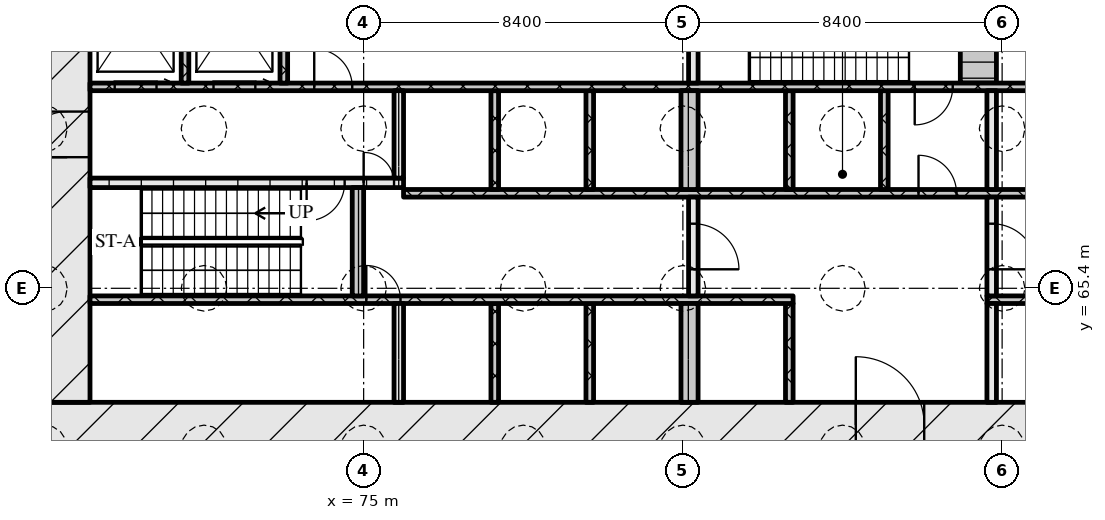
"""IFC4 building model, lengths in metres.
Left out: names, types, materials, properties, quantities, classifications, styles, units other than length and angle.
Written with IfcOpenShell. Run it as: python <this file> out.ifc"""

import sys

from ifc_helpers import new_model, si_unit, direction, frame, frame_2d, origin, place, context, subcontext, project, spatial, rectangle, extrude, element, fill, save


model = new_model("IFC4")
c1 = context("Model", 3, precision=1e-05, world=origin(), true_north=direction((0.0, 1.0)))
c2 = subcontext(c1, "Body", "Model", "MODEL_VIEW")
j1 = project(units=[si_unit("LENGTHUNIT", "METRE"), si_unit("PLANEANGLEUNIT", "RADIAN")], contexts=[c1])
p1 = place(None, origin())
s1 = spatial("IfcSite", under=j1, at=p1, CompositionType="ELEMENT")
p2 = place(p1, origin())
s2 = spatial("IfcBuilding", under=s1, at=p2, CompositionType="ELEMENT")
p3 = place(p2, frame((0.0, 0.0, -6.0)))
s3 = spatial("IfcBuildingStorey", under=s2, at=p3, CompositionType="ELEMENT", Elevation=-6.0)
p4 = place(p3, frame((66.6, 61.8, 0.0), z_axis=(0.0, 0.0, 1.0), x_axis=(1.0, 0.0, 0.0)))
e1 = element("IfcWall", 1, at=p4, inside=s3, PredefinedType="SOLIDWALL", context=c2, shape_type="SweptSolid", body=[
    extrude(rectangle(XDim=42.0, YDim=1.2, at=frame_2d((21.0, 0.0))), origin(), (0.0, 0.0, 1.0), 5.7),
])
p5 = place(p4, frame((21.35, 0.0, 0.0)))
e2 = element("IfcOpeningElement", 2, at=p5, cuts=e1, PredefinedType="OPENING", context=c2, shape_type="SweptSolid", body=[
    extrude(rectangle(XDim=1.8, YDim=2.1, at=frame_2d((0.9, 1.05))), frame((0.0, 0.61, 0.0), z_axis=(0.0, -1.0, 0.0), x_axis=(1.0, 0.0, 0.0)), (0.0, 0.0, 1.0), 1.22),
])
p6 = place(p3, frame((67.2, 62.4, 0.0), z_axis=(0.0, 0.0, 1.0), x_axis=(0.0, 1.0, 0.0)))
e3 = element("IfcWall", 3, at=p6, inside=s3, PredefinedType="SOLIDWALL", context=c2, shape_type="SweptSolid", body=[
    extrude(rectangle(XDim=12.0, YDim=1.2, at=frame_2d((6.0, 0.0))), origin(), (0.0, 0.0, 1.0), 5.7),
])
p7 = place(p6, frame((6.45, 0.0, 0.0)))
e4 = element("IfcOpeningElement", 4, at=p7, cuts=e3, PredefinedType="OPENING", context=c2, shape_type="SweptSolid", body=[
    extrude(rectangle(XDim=1.2, YDim=2.1, at=frame_2d((0.6, 1.05))), frame((0.0, 0.61, 0.0), z_axis=(0.0, -1.0, 0.0), x_axis=(1.0, 0.0, 0.0)), (0.0, 0.0, 1.0), 1.22),
])
p8 = place(p3, frame((75.925, 62.4, 0.0), z_axis=(0.0, 0.0, 1.0), x_axis=(0.0, 1.0, 0.0)))
e5 = element("IfcWall", 5, at=p8, inside=s3, PredefinedType="SOLIDWALL", context=c2, shape_type="SweptSolid", body=[
    extrude(rectangle(XDim=2.6, YDim=0.25, at=frame_2d((1.3, 0.0))), origin(), (0.0, 0.0, 1.0), 5.7),
])
for number, where, z_axis, x_axis in (
    (6, (78.45, 62.4, 0.0), (0.0, 0.0, 1.0), (0.0, 1.0, 0.0)),
    (7, (80.95, 62.4, 0.0), (0.0, 0.0, 1.0), (0.0, 1.0, 0.0)),
):
    element("IfcWall", number, at=place(p3, frame(where, z_axis=z_axis, x_axis=x_axis)), inside=s3, PredefinedType="SOLIDWALL", context=c2, shape_type="SweptSolid", body=[
        extrude(rectangle(XDim=2.6, YDim=0.2, at=frame_2d((1.3, 0.0))), origin(), (0.0, 0.0, 1.0), 5.7),
    ])
p9 = place(p3, frame((83.575, 62.4, 0.0), z_axis=(0.0, 0.0, 1.0), x_axis=(0.0, 1.0, 0.0)))
e8 = element("IfcWall", 8, at=p9, inside=s3, PredefinedType="SOLIDWALL", context=c2, shape_type="SweptSolid", body=[
    extrude(rectangle(XDim=2.6, YDim=0.45, at=frame_2d((1.3, 0.0))), origin(), (0.0, 0.0, 1.0), 5.7),
])
p10 = place(p3, frame((86.2, 62.4, 0.0), z_axis=(0.0, 0.0, 1.0), x_axis=(0.0, 1.0, 0.0)))
e9 = element("IfcWall", 9, at=p10, inside=s3, PredefinedType="SOLIDWALL", context=c2, shape_type="SweptSolid", body=[
    extrude(rectangle(XDim=2.6, YDim=0.2, at=frame_2d((1.3, 0.0))), origin(), (0.0, 0.0, 1.0), 5.7),
])
p11 = place(p3, frame((91.525, 62.4, 0.0), z_axis=(0.0, 0.0, 1.0), x_axis=(0.0, 1.0, 0.0)))
e10 = element("IfcWall", 10, at=p11, inside=s3, PredefinedType="SOLIDWALL", context=c2, shape_type="SweptSolid", body=[
    extrude(rectangle(XDim=2.6, YDim=0.25, at=frame_2d((1.3, 0.0))), origin(), (0.0, 0.0, 1.0), 5.7),
])
p12 = place(p3, frame((67.8, 65.1, 0.0), z_axis=(0.0, 0.0, 1.0), x_axis=(1.0, 0.0, 0.0)))
e11 = element("IfcWall", 11, at=p12, inside=s3, PredefinedType="SOLIDWALL", context=c2, shape_type="SweptSolid", body=[
    extrude(rectangle(XDim=18.5, YDim=0.2, at=frame_2d((9.25, 0.0))), origin(), (0.0, 0.0, 1.0), 5.7),
])
p13 = place(p12, frame((7.27, 0.0, 0.0)))
e12 = element("IfcOpeningElement", 12, at=p13, cuts=e11, PredefinedType="OPENING", context=c2, shape_type="SweptSolid", body=[
    extrude(rectangle(XDim=0.9, YDim=2.1, at=frame_2d((0.45, 1.05))), frame((0.0, 0.11, 0.0), z_axis=(0.0, -1.0, 0.0), x_axis=(1.0, 0.0, 0.0)), (0.0, 0.0, 1.0), 0.22),
])
p14 = place(p3, frame((91.4, 65.1, 0.0), z_axis=(0.0, 0.0, 1.0), x_axis=(1.0, 0.0, 0.0)))
e13 = element("IfcWall", 13, at=p14, inside=s3, PredefinedType="SOLIDWALL", context=c2, shape_type="SweptSolid", body=[
    extrude(rectangle(XDim=16.0, YDim=0.2, at=frame_2d((8.0, 0.0))), origin(), (0.0, 0.0, 1.0), 5.7),
])
p15 = place(p14, frame((7.83, 0.0, 0.0)))
e14 = element("IfcOpeningElement", 14, at=p15, cuts=e13, PredefinedType="OPENING", context=c2, shape_type="SweptSolid", body=[
    extrude(rectangle(XDim=0.9, YDim=2.1, at=frame_2d((0.45, 1.05))), frame((0.0, 0.11, 0.0), z_axis=(0.0, -1.0, 0.0), x_axis=(1.0, 0.0, 0.0)), (0.0, 0.0, 1.0), 0.22),
])
p16 = place(p3, frame((74.85, 65.2, 0.0), z_axis=(0.0, 0.0, 1.0), x_axis=(0.0, 1.0, 0.0)))
e15 = element("IfcWall", 15, at=p16, inside=s3, PredefinedType="SOLIDWALL", context=c2, shape_type="SweptSolid", body=[
    extrude(rectangle(XDim=2.85, YDim=0.3, at=frame_2d((1.425, 0.0))), origin(), (0.0, 0.0, 1.0), 5.7),
])
p17 = place(p3, frame((83.675, 65.2, 0.0), z_axis=(0.0, 0.0, 1.0), x_axis=(0.0, 1.0, 0.0)))
e16 = element("IfcWall", 16, at=p17, inside=s3, PredefinedType="SOLIDWALL", context=c2, shape_type="SweptSolid", body=[
    extrude(rectangle(XDim=2.6, YDim=0.25, at=frame_2d((1.3, 0.0))), origin(), (0.0, 0.0, 1.0), 5.7),
])
p18 = place(p17, frame((0.7, 0.0, 0.0)))
e17 = element("IfcOpeningElement", 17, at=p18, cuts=e16, PredefinedType="OPENING", context=c2, shape_type="SweptSolid", body=[
    extrude(rectangle(XDim=1.2, YDim=2.1, at=frame_2d((0.6, 1.05))), frame((0.0, 0.135, 0.0), z_axis=(0.0, -1.0, 0.0), x_axis=(1.0, 0.0, 0.0)), (0.0, 0.0, 1.0), 0.27),
])
p19 = place(p3, frame((91.525, 65.2, 0.0), z_axis=(0.0, 0.0, 1.0), x_axis=(0.0, 1.0, 0.0)))
e18 = element("IfcWall", 18, at=p19, inside=s3, PredefinedType="SOLIDWALL", context=c2, shape_type="SweptSolid", body=[
    extrude(rectangle(XDim=2.6, YDim=0.25, at=frame_2d((1.3, 0.0))), origin(), (0.0, 0.0, 1.0), 5.7),
])
p20 = place(p19, frame((0.7, 0.0, 0.0)))
e19 = element("IfcOpeningElement", 19, at=p20, cuts=e18, PredefinedType="OPENING", context=c2, shape_type="SweptSolid", body=[
    extrude(rectangle(XDim=1.2, YDim=2.1, at=frame_2d((0.6, 1.05))), frame((0.0, 0.135, 0.0), z_axis=(0.0, -1.0, 0.0), x_axis=(1.0, 0.0, 0.0)), (0.0, 0.0, 1.0), 0.27),
])
p21 = place(p3, frame((76.05, 67.9, 0.0), z_axis=(0.0, 0.0, 1.0), x_axis=(1.0, 0.0, 0.0)))
e20 = element("IfcWall", 20, at=p21, inside=s3, PredefinedType="SOLIDWALL", context=c2, shape_type="SweptSolid", body=[
    extrude(rectangle(XDim=23.1, YDim=0.2, at=frame_2d((11.55, 0.0))), origin(), (0.0, 0.0, 1.0), 5.7),
])
p22 = place(p21, frame((13.55, 0.0, 0.0)))
e21 = element("IfcOpeningElement", 21, at=p22, cuts=e20, PredefinedType="OPENING", context=c2, shape_type="SweptSolid", body=[
    extrude(rectangle(XDim=1.0, YDim=2.1, at=frame_2d((0.5, 1.05))), frame((0.0, 0.11, 0.0), z_axis=(0.0, -1.0, 0.0), x_axis=(1.0, 0.0, 0.0)), (0.0, 0.0, 1.0), 0.22),
])
for number, where, z_axis, x_axis in (
    (22, (78.45, 68.0, 0.0), (0.0, 0.0, 1.0), (0.0, 1.0, 0.0)),
    (23, (80.95, 68.0, 0.0), (0.0, 0.0, 1.0), (0.0, 1.0, 0.0)),
):
    element("IfcWall", number, at=place(p3, frame(where, z_axis=z_axis, x_axis=x_axis)), inside=s3, PredefinedType="SOLIDWALL", context=c2, shape_type="SweptSolid", body=[
        extrude(rectangle(XDim=2.6, YDim=0.2, at=frame_2d((1.3, 0.0))), origin(), (0.0, 0.0, 1.0), 5.7),
    ])
p23 = place(p3, frame((83.575, 68.0, 0.0), z_axis=(0.0, 0.0, 1.0), x_axis=(0.0, 1.0, 0.0)))
e24 = element("IfcWall", 24, at=p23, inside=s3, PredefinedType="SOLIDWALL", context=c2, shape_type="SweptSolid", body=[
    extrude(rectangle(XDim=2.6, YDim=0.45, at=frame_2d((1.3, 0.0))), origin(), (0.0, 0.0, 1.0), 5.7),
])
for number, where, z_axis, x_axis in (
    (25, (86.2, 68.0, 0.0), (0.0, 0.0, 1.0), (0.0, 1.0, 0.0)),
    (26, (88.7, 68.0, 0.0), (0.0, 0.0, 1.0), (0.0, 1.0, 0.0)),
):
    element("IfcWall", number, at=place(p3, frame(where, z_axis=z_axis, x_axis=x_axis)), inside=s3, PredefinedType="SOLIDWALL", context=c2, shape_type="SweptSolid", body=[
        extrude(rectangle(XDim=2.6, YDim=0.2, at=frame_2d((1.3, 0.0))), origin(), (0.0, 0.0, 1.0), 5.7),
    ])
p24 = place(p3, frame((91.525, 68.0, 0.0), z_axis=(0.0, 0.0, 1.0), x_axis=(0.0, 1.0, 0.0)))
e27 = element("IfcWall", 27, at=p24, inside=s3, PredefinedType="SOLIDWALL", context=c2, shape_type="SweptSolid", body=[
    extrude(rectangle(XDim=2.6, YDim=0.25, at=frame_2d((1.3, 0.0))), origin(), (0.0, 0.0, 1.0), 5.7),
])
p25 = place(p3, frame((67.8, 68.175, 0.0), z_axis=(0.0, 0.0, 1.0), x_axis=(1.0, 0.0, 0.0)))
e28 = element("IfcWall", 28, at=p25, inside=s3, PredefinedType="SOLIDWALL", context=c2, shape_type="SweptSolid", body=[
    extrude(rectangle(XDim=8.25, YDim=0.25, at=frame_2d((4.125, 0.0))), origin(), (0.0, 0.0, 1.0), 5.7),
])
p26 = place(p25, frame((5.7, 0.0, 0.0)))
e29 = element("IfcOpeningElement", 29, at=p26, cuts=e28, PredefinedType="OPENING", context=c2, shape_type="SweptSolid", body=[
    extrude(rectangle(XDim=1.0, YDim=2.1, at=frame_2d((0.5, 1.05))), frame((0.0, 0.135, 0.0), z_axis=(0.0, -1.0, 0.0), x_axis=(1.0, 0.0, 0.0)), (0.0, 0.0, 1.0), 0.27),
])
p27 = place(p25, frame((7.2, 0.0, 0.0)))
e30 = element("IfcOpeningElement", 30, at=p27, cuts=e28, PredefinedType="OPENING", context=c2, shape_type="SweptSolid", body=[
    extrude(rectangle(XDim=0.8, YDim=2.1, at=frame_2d((0.4, 1.05))), frame((0.0, 0.135, 0.0), z_axis=(0.0, -1.0, 0.0), x_axis=(1.0, 0.0, 0.0)), (0.0, 0.0, 1.0), 0.27),
])
p28 = place(p3, frame((75.925, 68.3, 0.0), z_axis=(0.0, 0.0, 1.0), x_axis=(0.0, 1.0, 0.0)))
e31 = element("IfcWall", 31, at=p28, inside=s3, PredefinedType="SOLIDWALL", context=c2, shape_type="SweptSolid", body=[
    extrude(rectangle(XDim=2.3, YDim=0.25, at=frame_2d((1.15, 0.0))), origin(), (0.0, 0.0, 1.0), 5.7),
])
p29 = place(p3, frame((67.8, 70.7, 0.0), z_axis=(0.0, 0.0, 1.0), x_axis=(1.0, 0.0, 0.0)))
e32 = element("IfcWall", 32, at=p29, inside=s3, PredefinedType="SOLIDWALL", context=c2, shape_type="SweptSolid", body=[
    extrude(rectangle(XDim=39.6, YDim=0.2, at=frame_2d((19.8, 0.0))), origin(), (0.0, 0.0, 1.0), 5.7),
])
p30 = place(p29, frame((0.65, 0.0, 0.0)))
e33 = element("IfcOpeningElement", 33, at=p30, cuts=e32, PredefinedType="OPENING", context=c2, shape_type="SweptSolid", body=[
    extrude(rectangle(XDim=1.1, YDim=2.1, at=frame_2d((0.55, 1.05))), frame((0.0, 0.11, 0.0), z_axis=(0.0, -1.0, 0.0), x_axis=(1.0, 0.0, 0.0)), (0.0, 0.0, 1.0), 0.22),
])
p31 = place(p29, frame((3.25, 0.0, 0.0)))
e34 = element("IfcOpeningElement", 34, at=p31, cuts=e32, PredefinedType="OPENING", context=c2, shape_type="SweptSolid", body=[
    extrude(rectangle(XDim=1.1, YDim=2.1, at=frame_2d((0.55, 1.05))), frame((0.0, 0.11, 0.0), z_axis=(0.0, -1.0, 0.0), x_axis=(1.0, 0.0, 0.0)), (0.0, 0.0, 1.0), 0.22),
])
p32 = place(p29, frame((5.9, 0.0, 0.0)))
e35 = element("IfcOpeningElement", 35, at=p32, cuts=e32, PredefinedType="OPENING", context=c2, shape_type="SweptSolid", body=[
    extrude(rectangle(XDim=1.0, YDim=2.1, at=frame_2d((0.5, 1.05))), frame((0.0, 0.11, 0.0), z_axis=(0.0, -1.0, 0.0), x_axis=(1.0, 0.0, 0.0)), (0.0, 0.0, 1.0), 0.22),
])
p33 = place(p29, frame((21.7, 0.0, 0.0)))
e36 = element("IfcOpeningElement", 36, at=p33, cuts=e32, PredefinedType="OPENING", context=c2, shape_type="SweptSolid", body=[
    extrude(rectangle(XDim=1.0, YDim=2.1, at=frame_2d((0.5, 1.05))), frame((0.0, 0.11, 0.0), z_axis=(0.0, -1.0, 0.0), x_axis=(1.0, 0.0, 0.0)), (0.0, 0.0, 1.0), 0.22),
])
p34 = place(p29, frame((32.7, 0.0, 0.0)))
e37 = element("IfcOpeningElement", 37, at=p34, cuts=e32, PredefinedType="OPENING", context=c2, shape_type="SweptSolid", body=[
    extrude(rectangle(XDim=1.0, YDim=2.1, at=frame_2d((0.5, 1.05))), frame((0.0, 0.11, 0.0), z_axis=(0.0, -1.0, 0.0), x_axis=(1.0, 0.0, 0.0)), (0.0, 0.0, 1.0), 0.22),
])
p35 = place(p29, frame((35.25, 0.0, 0.0)))
e38 = element("IfcOpeningElement", 38, at=p35, cuts=e32, PredefinedType="OPENING", context=c2, shape_type="SweptSolid", body=[
    extrude(rectangle(XDim=1.1, YDim=2.1, at=frame_2d((0.55, 1.05))), frame((0.0, 0.11, 0.0), z_axis=(0.0, -1.0, 0.0), x_axis=(1.0, 0.0, 0.0)), (0.0, 0.0, 1.0), 0.22),
])
p36 = place(p29, frame((37.85, 0.0, 0.0)))
e39 = element("IfcOpeningElement", 39, at=p36, cuts=e32, PredefinedType="OPENING", context=c2, shape_type="SweptSolid", body=[
    extrude(rectangle(XDim=1.1, YDim=2.1, at=frame_2d((0.55, 1.05))), frame((0.0, 0.11, 0.0), z_axis=(0.0, -1.0, 0.0), x_axis=(1.0, 0.0, 0.0)), (0.0, 0.0, 1.0), 0.22),
])
p37 = place(p3, frame((70.3, 70.8, 0.0), z_axis=(0.0, 0.0, 1.0), x_axis=(0.0, 1.0, 0.0)))
e40 = element("IfcWall", 40, at=p37, inside=s3, PredefinedType="SOLIDWALL", context=c2, shape_type="SweptSolid", body=[
    extrude(rectangle(XDim=3.6, YDim=0.2, at=frame_2d((1.8, 0.0))), origin(), (0.0, 0.0, 1.0), 5.7),
])
p38 = place(p3, frame((72.9, 70.8, 0.0), z_axis=(0.0, 0.0, 1.0), x_axis=(0.0, 1.0, 0.0)))
e41 = element("IfcWall", 41, at=p38, inside=s3, PredefinedType="SOLIDWALL", context=c2, shape_type="SweptSolid", body=[
    extrude(rectangle(XDim=1.2, YDim=0.2, at=frame_2d((0.6, 0.0))), origin(), (0.0, 0.0, 1.0), 5.7),
])
p39 = place(p3, frame((83.675, 70.8, 0.0), z_axis=(0.0, 0.0, 1.0), x_axis=(0.0, 1.0, 0.0)))
e42 = element("IfcWall", 42, at=p39, inside=s3, PredefinedType="SOLIDWALL", context=c2, shape_type="SweptSolid", body=[
    extrude(rectangle(XDim=1.2, YDim=0.25, at=frame_2d((0.6, 0.0))), origin(), (0.0, 0.0, 1.0), 5.7),
])
p40 = place(p3, frame((91.175, 70.8, 0.0), z_axis=(0.0, 0.0, 1.0), x_axis=(0.0, 1.0, 0.0)))
e43 = element("IfcWall", 43, at=p40, inside=s3, PredefinedType="SOLIDWALL", context=c2, shape_type="SweptSolid", body=[
    extrude(rectangle(XDim=1.2, YDim=0.95, at=frame_2d((0.6, 0.0))), origin(), (0.0, 0.0, 1.0), 5.7),
])
p41 = place(p5, origin())
e44 = element("IfcDoor", 44, at=p41, inside=s3, OperationType="DOUBLE_DOOR_SINGLE_SWING", PredefinedType="DOOR", context=c2, shape_type="SweptSolid", body=[
    extrude(rectangle(XDim=1.8, YDim=2.1, at=frame_2d((0.9, 1.05))), frame((0.0, 0.025, 0.0), z_axis=(0.0, -1.0, 0.0), x_axis=(1.0, 0.0, 0.0)), (0.0, 0.0, 1.0), 0.05),
])
fill(e2, e44)
p42 = place(p13, origin())
e45 = element("IfcDoor", 45, at=p42, inside=s3, OperationType="SINGLE_SWING_LEFT", PredefinedType="DOOR", context=c2, shape_type="SweptSolid", body=[
    extrude(rectangle(XDim=0.9, YDim=2.1, at=frame_2d((0.45, 1.05))), frame((0.0, 0.025, 0.0), z_axis=(0.0, -1.0, 0.0), x_axis=(1.0, 0.0, 0.0)), (0.0, 0.0, 1.0), 0.05),
])
fill(e12, e45)
p43 = place(p18, origin())
e46 = element("IfcDoor", 46, at=p43, inside=s3, OperationType="SINGLE_SWING_RIGHT", PredefinedType="DOOR", context=c2, shape_type="SweptSolid", body=[
    extrude(rectangle(XDim=1.2, YDim=2.1, at=frame_2d((0.6, 1.05))), frame((0.0, 0.025, 0.0), z_axis=(0.0, -1.0, 0.0), x_axis=(1.0, 0.0, 0.0)), (0.0, 0.0, 1.0), 0.05),
])
fill(e17, e46)
p44 = place(p20, origin())
e47 = element("IfcDoor", 47, at=p44, inside=s3, OperationType="SINGLE_SWING_RIGHT", PredefinedType="DOOR", context=c2, shape_type="SweptSolid", body=[
    extrude(rectangle(XDim=1.2, YDim=2.1, at=frame_2d((0.6, 1.05))), frame((0.0, 0.025, 0.0), z_axis=(0.0, -1.0, 0.0), x_axis=(1.0, 0.0, 0.0)), (0.0, 0.0, 1.0), 0.05),
])
fill(e19, e47)
p45 = place(p22, origin())
e48 = element("IfcDoor", 48, at=p45, inside=s3, OperationType="SINGLE_SWING_LEFT", PredefinedType="DOOR", context=c2, shape_type="SweptSolid", body=[
    extrude(rectangle(XDim=1.0, YDim=2.1, at=frame_2d((0.5, 1.05))), frame((0.0, 0.025, 0.0), z_axis=(0.0, -1.0, 0.0), x_axis=(1.0, 0.0, 0.0)), (0.0, 0.0, 1.0), 0.05),
])
fill(e21, e48)
p46 = place(p26, origin())
e49 = element("IfcDoor", 49, at=p46, inside=s3, OperationType="SINGLE_SWING_RIGHT", PredefinedType="DOOR", context=c2, shape_type="SweptSolid", body=[
    extrude(rectangle(XDim=1.0, YDim=2.1, at=frame_2d((0.5, 1.05))), frame((0.0, 0.025, 0.0), z_axis=(0.0, -1.0, 0.0), x_axis=(1.0, 0.0, 0.0)), (0.0, 0.0, 1.0), 0.05),
])
fill(e29, e49)
p47 = place(p27, origin())
e50 = element("IfcDoor", 50, at=p47, inside=s3, OperationType="SINGLE_SWING_LEFT", PredefinedType="DOOR", context=c2, shape_type="SweptSolid", body=[
    extrude(rectangle(XDim=0.8, YDim=2.1, at=frame_2d((0.4, 1.05))), frame((0.0, 0.025, 0.0), z_axis=(0.0, -1.0, 0.0), x_axis=(1.0, 0.0, 0.0)), (0.0, 0.0, 1.0), 0.05),
])
fill(e30, e50)
p48 = place(p7, origin())
e51 = element("IfcDoor", 51, at=p48, inside=s3, OperationType="SINGLE_SWING_LEFT", PredefinedType="DOOR", context=c2, shape_type="SweptSolid", body=[
    extrude(rectangle(XDim=1.2, YDim=2.1, at=frame_2d((0.6, 1.05))), frame((0.0, 0.025, 0.0), z_axis=(0.0, -1.0, 0.0), x_axis=(1.0, 0.0, 0.0)), (0.0, 0.0, 1.0), 0.05),
])
fill(e4, e51)
p49 = place(p30, origin())
e52 = element("IfcDoor", 52, at=p49, inside=s3, OperationType="SLIDING_TO_RIGHT", PredefinedType="DOOR", context=c2, shape_type="SweptSolid", body=[
    extrude(rectangle(XDim=1.1, YDim=2.1, at=frame_2d((0.55, 1.05))), frame((0.0, 0.025, 0.0), z_axis=(0.0, -1.0, 0.0), x_axis=(1.0, 0.0, 0.0)), (0.0, 0.0, 1.0), 0.05),
])
fill(e33, e52)
p50 = place(p31, origin())
e53 = element("IfcDoor", 53, at=p50, inside=s3, OperationType="SLIDING_TO_RIGHT", PredefinedType="DOOR", context=c2, shape_type="SweptSolid", body=[
    extrude(rectangle(XDim=1.1, YDim=2.1, at=frame_2d((0.55, 1.05))), frame((0.0, 0.025, 0.0), z_axis=(0.0, -1.0, 0.0), x_axis=(1.0, 0.0, 0.0)), (0.0, 0.0, 1.0), 0.05),
])
fill(e34, e53)
p51 = place(p32, origin())
e54 = element("IfcDoor", 54, at=p51, inside=s3, OperationType="SINGLE_SWING_LEFT", PredefinedType="DOOR", context=c2, shape_type="SweptSolid", body=[
    extrude(rectangle(XDim=1.0, YDim=2.1, at=frame_2d((0.5, 1.05))), frame((0.0, 0.025, 0.0), z_axis=(0.0, -1.0, 0.0), x_axis=(1.0, 0.0, 0.0)), (0.0, 0.0, 1.0), 0.05),
])
fill(e35, e54)
p52 = place(p33, origin())
e55 = element("IfcDoor", 55, at=p52, inside=s3, OperationType="SINGLE_SWING_RIGHT", PredefinedType="DOOR", context=c2, shape_type="SweptSolid", body=[
    extrude(rectangle(XDim=1.0, YDim=2.1, at=frame_2d((0.5, 1.05))), frame((0.0, 0.025, 0.0), z_axis=(0.0, -1.0, 0.0), x_axis=(1.0, 0.0, 0.0)), (0.0, 0.0, 1.0), 0.05),
])
fill(e36, e55)
save(model, sys.argv[1])
